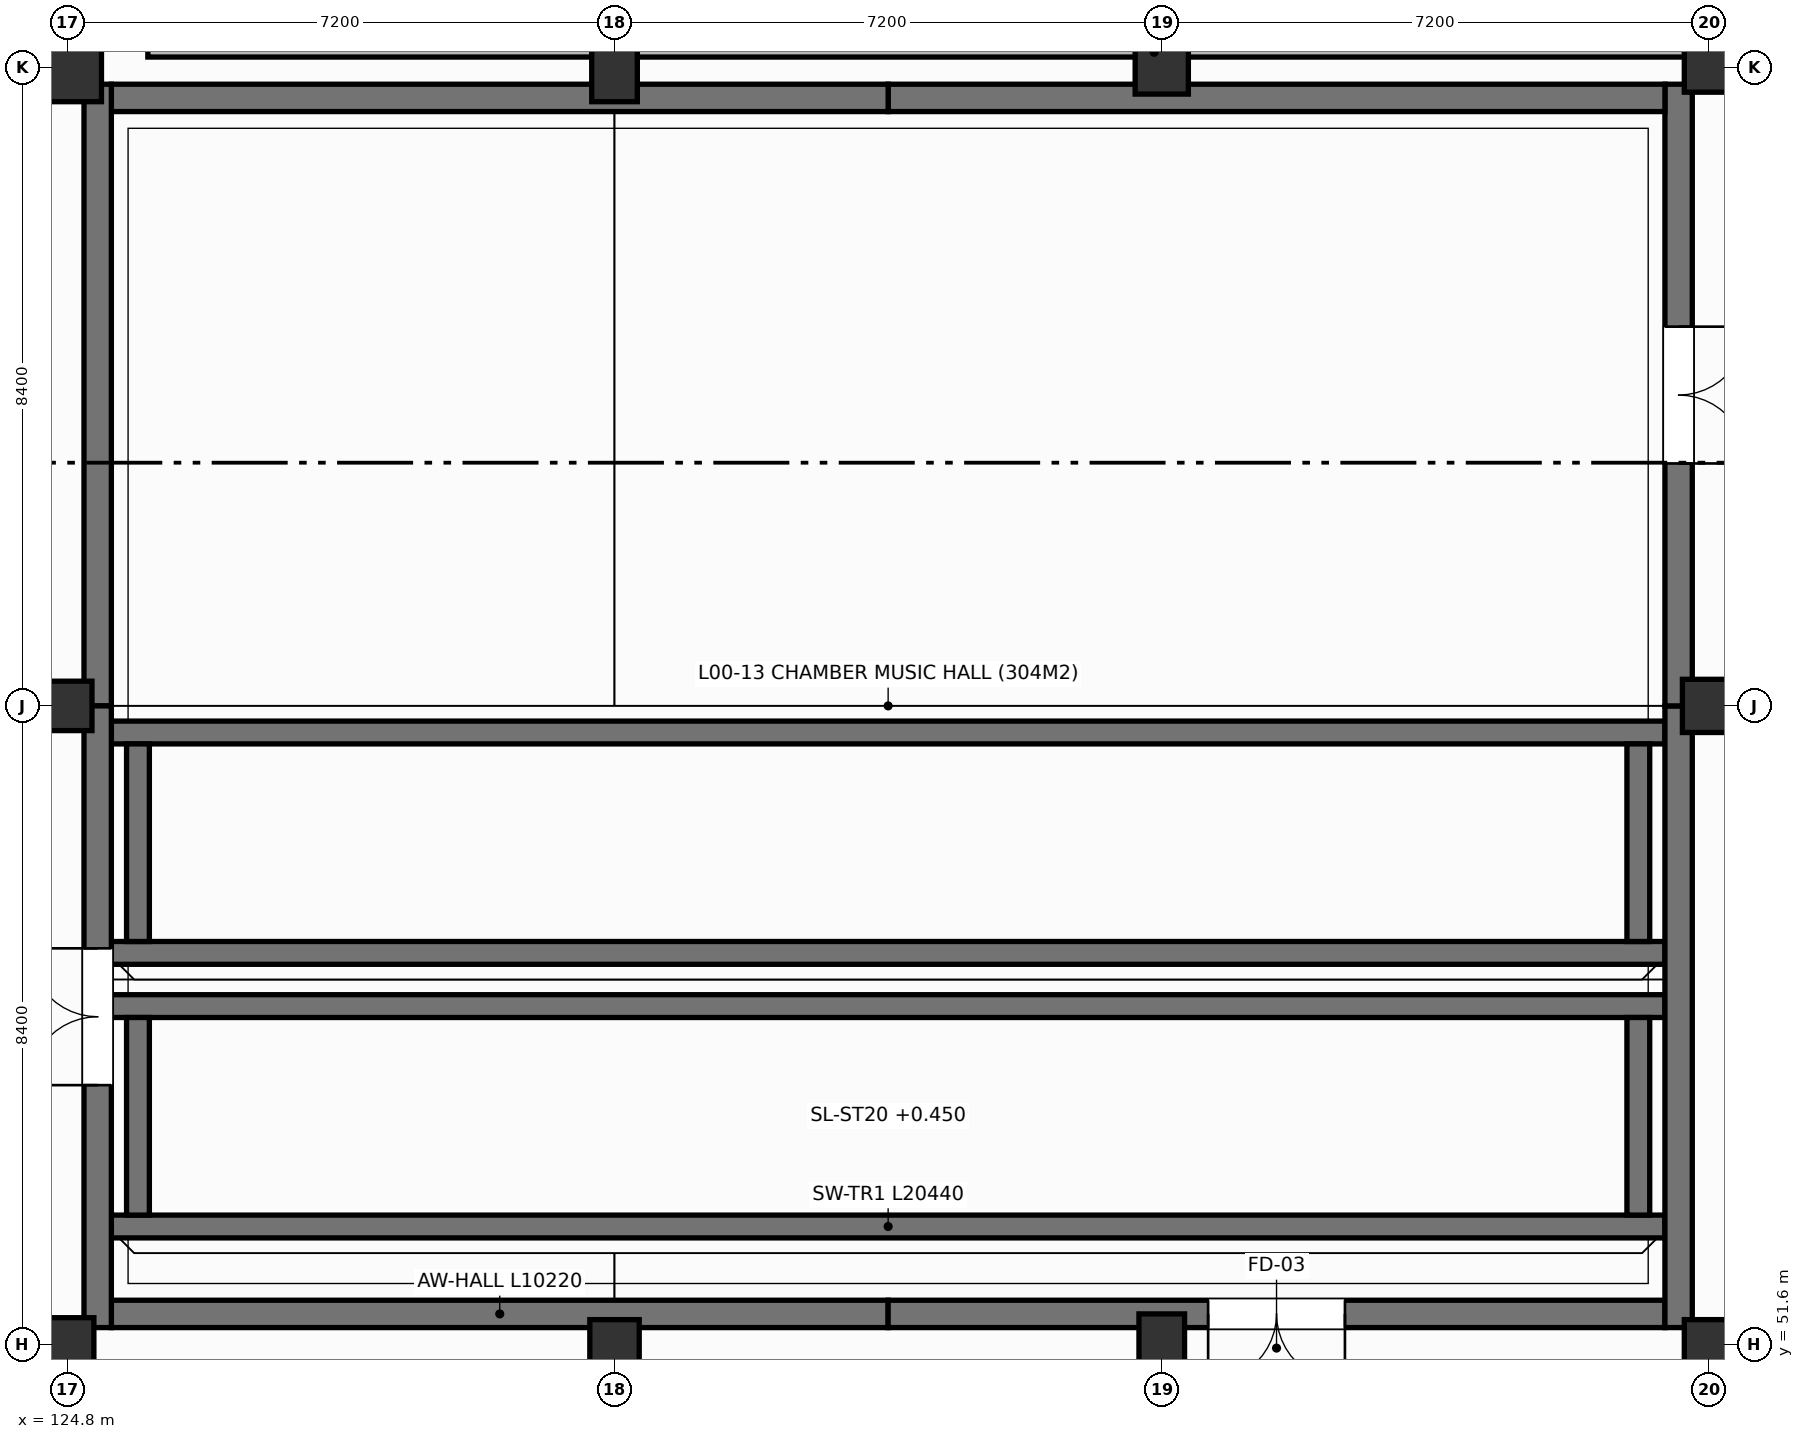
"""IFC4 building model, lengths in metres.
Left out: names, types, materials, properties, quantities, classifications, styles, units other than length and angle.
Written with IfcOpenShell. Run it as: python <this file> out.ifc"""

import sys

from ifc_helpers import new_model, si_unit, direction, frame, frame_2d, origin, origin_2d, place, context, subcontext, project, spatial, rectangle, extrude, element, fill, save


model = new_model("IFC4")
c1 = context("Model", 3, precision=1e-05, world=origin(), true_north=direction((0.0, 1.0)))
c2 = subcontext(c1, "Body", "Model", "MODEL_VIEW")
j1 = project(units=[si_unit("LENGTHUNIT", "METRE"), si_unit("PLANEANGLEUNIT", "RADIAN")], contexts=[c1])
p1 = place(None, origin())
s1 = spatial("IfcSite", under=j1, at=p1, CompositionType="ELEMENT")
p2 = place(p1, origin())
s2 = spatial("IfcBuilding", under=s1, at=p2, CompositionType="ELEMENT")
p3 = place(p2, origin())
s3 = spatial("IfcBuildingStorey", under=s2, at=p3, CompositionType="ELEMENT", Elevation=0.0)
p4 = place(p3, frame((124.8, 51.6, 0.0), z_axis=(0.0, 0.0, 1.0), x_axis=(1.0, 0.0, 0.0)))
e1 = element("IfcColumn", 1, at=p4, inside=s3, PredefinedType="COLUMN", context=c2, shape_type="SweptSolid", body=[
    extrude(rectangle(XDim=0.7, YDim=0.7, at=origin_2d()), origin(), (0.0, 0.0, 1.0), 4.8),
])
p5 = place(p3, frame((124.8, 60.0, 0.0), z_axis=(0.0, 0.0, 1.0), x_axis=(1.0, 0.0, 0.0)))
e2 = element("IfcColumn", 2, at=p5, inside=s3, PredefinedType="COLUMN", context=c2, shape_type="SweptSolid", body=[
    extrude(rectangle(XDim=0.65, YDim=0.65, at=origin_2d()), origin(), (0.0, 0.0, 1.0), 4.8),
])
p6 = place(p3, frame((124.8, 68.4, 0.0), z_axis=(0.0, 0.0, 1.0), x_axis=(1.0, 0.0, 0.0)))
e3 = element("IfcColumn", 3, at=p6, inside=s3, PredefinedType="COLUMN", context=c2, shape_type="SweptSolid", body=[
    extrude(rectangle(XDim=0.9, YDim=0.9, at=origin_2d()), origin(), (0.0, 0.0, 1.0), 4.8),
])
p7 = place(p3, frame((132.0, 51.6, 0.0), z_axis=(0.0, 0.0, 1.0), x_axis=(1.0, 0.0, 0.0)))
e4 = element("IfcColumn", 4, at=p7, inside=s3, PredefinedType="COLUMN", context=c2, shape_type="SweptSolid", body=[
    extrude(rectangle(XDim=0.65, YDim=0.65, at=origin_2d()), origin(), (0.0, 0.0, 1.0), 4.8),
])
p8 = place(p3, frame((132.0, 68.4, 0.0), z_axis=(0.0, 0.0, 1.0), x_axis=(1.0, 0.0, 0.0)))
e5 = element("IfcColumn", 5, at=p8, inside=s3, PredefinedType="COLUMN", context=c2, shape_type="SweptSolid", body=[
    extrude(rectangle(XDim=0.6, YDim=0.9, at=origin_2d()), origin(), (0.0, 0.0, 1.0), 4.8),
])
p9 = place(p3, frame((139.2, 51.6, 0.0), z_axis=(0.0, 0.0, 1.0), x_axis=(1.0, 0.0, 0.0)))
e6 = element("IfcColumn", 6, at=p9, inside=s3, PredefinedType="COLUMN", context=c2, shape_type="SweptSolid", body=[
    extrude(rectangle(XDim=0.6, YDim=0.8, at=origin_2d()), origin(), (0.0, 0.0, 1.0), 4.8),
])
p10 = place(p3, frame((139.2, 68.4, 0.0), z_axis=(0.0, 0.0, 1.0), x_axis=(1.0, 0.0, 0.0)))
e7 = element("IfcColumn", 7, at=p10, inside=s3, PredefinedType="COLUMN", context=c2, shape_type="SweptSolid", body=[
    extrude(rectangle(XDim=0.7, YDim=0.7, at=origin_2d()), origin(), (0.0, 0.0, 1.0), 4.8),
])
p11 = place(p3, frame((146.4, 51.6, 0.0), z_axis=(0.0, 0.0, 1.0), x_axis=(1.0, 0.0, 0.0)))
e8 = element("IfcColumn", 8, at=p11, inside=s3, PredefinedType="COLUMN", context=c2, shape_type="SweptSolid", body=[
    extrude(rectangle(XDim=0.65, YDim=0.65, at=origin_2d()), origin(), (0.0, 0.0, 1.0), 4.8),
])
p12 = place(p3, frame((146.4, 60.0, 0.0), z_axis=(0.0, 0.0, 1.0), x_axis=(1.0, 0.0, 0.0)))
e9 = element("IfcColumn", 9, at=p12, inside=s3, PredefinedType="COLUMN", context=c2, shape_type="SweptSolid", body=[
    extrude(rectangle(XDim=0.7, YDim=0.7, at=origin_2d()), origin(), (0.0, 0.0, 1.0), 4.8),
])
p13 = place(p3, frame((146.4, 68.4, 0.0), z_axis=(0.0, 0.0, 1.0), x_axis=(1.0, 0.0, 0.0)))
e10 = element("IfcColumn", 10, at=p13, inside=s3, PredefinedType="COLUMN", context=c2, shape_type="SweptSolid", body=[
    extrude(rectangle(XDim=0.65, YDim=0.65, at=origin_2d()), origin(), (0.0, 0.0, 1.0), 4.8),
])
for number, where, z_axis, x_axis in (
    (11, (125.38, 53.15, 0.0), (0.0, 0.0, 1.0), (1.0, 0.0, 0.0)),
    (12, (125.38, 56.05, 0.0), (0.0, 0.0, 1.0), (1.0, 0.0, 0.0)),
):
    element("IfcWall", number, at=place(p3, frame(where, z_axis=z_axis, x_axis=x_axis)), inside=s3, PredefinedType="SHEAR", context=c2, shape_type="SweptSolid", body=[
        extrude(rectangle(XDim=20.44, YDim=0.3, at=frame_2d((10.22, 0.0))), origin(), (0.0, 0.0, 1.0), 0.25),
    ])
for number, where, z_axis, x_axis in (
    (13, (125.73, 53.3, 0.0), (0.0, 0.0, 1.0), (0.0, 1.0, 0.0)),
    (14, (145.47, 53.3, 0.0), (0.0, 0.0, 1.0), (0.0, 1.0, 0.0)),
):
    element("IfcWall", number, at=place(p3, frame(where, z_axis=z_axis, x_axis=x_axis)), inside=s3, PredefinedType="SHEAR", context=c2, shape_type="SweptSolid", body=[
        extrude(rectangle(XDim=2.6, YDim=0.3, at=frame_2d((1.3, 0.0))), origin(), (0.0, 0.0, 1.0), 0.25),
    ])
for number, where, z_axis, x_axis in (
    (15, (125.38, 56.75, 0.0), (0.0, 0.0, 1.0), (1.0, 0.0, 0.0)),
    (16, (125.38, 59.65, 0.0), (0.0, 0.0, 1.0), (1.0, 0.0, 0.0)),
):
    element("IfcWall", number, at=place(p3, frame(where, z_axis=z_axis, x_axis=x_axis)), inside=s3, PredefinedType="SHEAR", context=c2, shape_type="SweptSolid", body=[
        extrude(rectangle(XDim=20.44, YDim=0.3, at=frame_2d((10.22, 0.0))), origin(), (0.0, 0.0, 1.0), 0.65),
    ])
for number, where, z_axis, x_axis in (
    (17, (125.73, 56.9, 0.0), (0.0, 0.0, 1.0), (0.0, 1.0, 0.0)),
    (18, (145.47, 56.9, 0.0), (0.0, 0.0, 1.0), (0.0, 1.0, 0.0)),
):
    element("IfcWall", number, at=place(p3, frame(where, z_axis=z_axis, x_axis=x_axis)), inside=s3, PredefinedType="SHEAR", context=c2, shape_type="SweptSolid", body=[
        extrude(rectangle(XDim=2.6, YDim=0.3, at=frame_2d((1.3, 0.0))), origin(), (0.0, 0.0, 1.0), 0.65),
    ])
p14 = place(p3, frame((125.38, 52.0, 0.0), z_axis=(0.0, 0.0, 1.0), x_axis=(1.0, 0.0, 0.0)))
e19 = element("IfcWall", 19, at=p14, inside=s3, PredefinedType="SHEAR", context=c2, shape_type="SweptSolid", body=[
    extrude(rectangle(XDim=10.22, YDim=0.36, at=frame_2d((5.11, 0.0))), origin(), (0.0, 0.0, 1.0), 4.8),
])
p15 = place(p3, frame((135.6, 52.0, 0.0), z_axis=(0.0, 0.0, 1.0), x_axis=(1.0, 0.0, 0.0)))
e20 = element("IfcWall", 20, at=p15, inside=s3, PredefinedType="SHEAR", context=c2, shape_type="SweptSolid", body=[
    extrude(rectangle(XDim=10.22, YDim=0.36, at=frame_2d((5.11, 0.0))), origin(), (0.0, 0.0, 1.0), 4.8),
])
p16 = place(p15, frame((4.21, 0.0, 0.0)))
e21 = element("IfcOpeningElement", 21, at=p16, cuts=e20, PredefinedType="OPENING", context=c2, shape_type="SweptSolid", body=[
    extrude(rectangle(XDim=1.8, YDim=2.25, at=frame_2d((0.9, 1.125))), frame((0.0, 0.19, 0.0), z_axis=(0.0, -1.0, 0.0), x_axis=(1.0, 0.0, 0.0)), (0.0, 0.0, 1.0), 0.38),
])
p17 = place(p3, frame((146.0, 51.82, 0.0), z_axis=(0.0, 0.0, 1.0), x_axis=(0.0, 1.0, 0.0)))
e22 = element("IfcWall", 22, at=p17, inside=s3, PredefinedType="SHEAR", context=c2, shape_type="SweptSolid", body=[
    extrude(rectangle(XDim=8.18, YDim=0.36, at=frame_2d((4.09, 0.0))), origin(), (0.0, 0.0, 1.0), 4.8),
])
p18 = place(p3, frame((146.0, 60.0, 0.0), z_axis=(0.0, 0.0, 1.0), x_axis=(0.0, 1.0, 0.0)))
e23 = element("IfcWall", 23, at=p18, inside=s3, PredefinedType="SHEAR", context=c2, shape_type="SweptSolid", body=[
    extrude(rectangle(XDim=8.18, YDim=0.36, at=frame_2d((4.09, 0.0))), origin(), (0.0, 0.0, 1.0), 4.8),
])
p19 = place(p18, frame((3.19, 0.0, 0.0)))
e24 = element("IfcOpeningElement", 24, at=p19, cuts=e23, PredefinedType="OPENING", context=c2, shape_type="SweptSolid", body=[
    extrude(rectangle(XDim=1.8, YDim=2.25, at=frame_2d((0.9, 1.125))), frame((0.0, 0.19, 0.0), z_axis=(0.0, -1.0, 0.0), x_axis=(1.0, 0.0, 0.0)), (0.0, 0.0, 1.0), 0.38),
])
p20 = place(p3, frame((145.82, 68.0, 0.0), z_axis=(0.0, 0.0, 1.0), x_axis=(-1.0, 0.0, 0.0)))
e25 = element("IfcWall", 25, at=p20, inside=s3, PredefinedType="SHEAR", context=c2, shape_type="SweptSolid", body=[
    extrude(rectangle(XDim=10.22, YDim=0.36, at=frame_2d((5.11, 0.0))), origin(), (0.0, 0.0, 1.0), 4.8),
])
p21 = place(p3, frame((135.6, 68.0, 0.0), z_axis=(0.0, 0.0, 1.0), x_axis=(-1.0, 0.0, 0.0)))
e26 = element("IfcWall", 26, at=p21, inside=s3, PredefinedType="SHEAR", context=c2, shape_type="SweptSolid", body=[
    extrude(rectangle(XDim=10.22, YDim=0.36, at=frame_2d((5.11, 0.0))), origin(), (0.0, 0.0, 1.0), 4.8),
])
p22 = place(p3, frame((125.2, 68.18, 0.0), z_axis=(0.0, 0.0, 1.0), x_axis=(0.0, -1.0, 0.0)))
e27 = element("IfcWall", 27, at=p22, inside=s3, PredefinedType="SHEAR", context=c2, shape_type="SweptSolid", body=[
    extrude(rectangle(XDim=8.18, YDim=0.36, at=frame_2d((4.09, 0.0))), origin(), (0.0, 0.0, 1.0), 4.8),
])
p23 = place(p3, frame((125.2, 60.0, 0.0), z_axis=(0.0, 0.0, 1.0), x_axis=(0.0, -1.0, 0.0)))
e28 = element("IfcWall", 28, at=p23, inside=s3, PredefinedType="SHEAR", context=c2, shape_type="SweptSolid", body=[
    extrude(rectangle(XDim=8.18, YDim=0.36, at=frame_2d((4.09, 0.0))), origin(), (0.0, 0.0, 1.0), 4.8),
])
p24 = place(p23, frame((3.19, 0.0, 0.0)))
e29 = element("IfcOpeningElement", 29, at=p24, cuts=e28, PredefinedType="OPENING", context=c2, shape_type="SweptSolid", body=[
    extrude(rectangle(XDim=1.8, YDim=2.25, at=frame_2d((0.9, 1.125))), frame((0.0, 0.19, 0.0), z_axis=(0.0, -1.0, 0.0), x_axis=(1.0, 0.0, 0.0)), (0.0, 0.0, 1.0), 0.38),
])
p25 = place(p3, frame((125.86, 68.6, 0.0), z_axis=(0.0, 0.0, 1.0), x_axis=(1.0, 0.0, 0.0)))
e30 = element("IfcWall", 30, at=p25, inside=s3, PredefinedType="PARTITIONING", context=c2, shape_type="SweptSolid", body=[
    extrude(rectangle(XDim=26.48, YDim=0.125, at=frame_2d((13.24, 0.0))), origin(), (0.0, 0.0, 1.0), 3.515),
])
p26 = place(p16, frame((1.8, 0.0, 0.0), z_axis=(0.0, 0.0, 1.0), x_axis=(-1.0, 0.0, 0.0)))
e31 = element("IfcDoor", 31, at=p26, inside=s3, OperationType="DOUBLE_DOOR_SINGLE_SWING", PredefinedType="DOOR", context=c2, shape_type="SweptSolid", body=[
    extrude(rectangle(XDim=1.8, YDim=2.25, at=frame_2d((0.9, 1.125))), frame((0.0, 0.025, 0.0), z_axis=(0.0, -1.0, 0.0), x_axis=(1.0, 0.0, 0.0)), (0.0, 0.0, 1.0), 0.05),
])
fill(e21, e31)
p27 = place(p19, frame((1.8, 0.0, 0.0), z_axis=(0.0, 0.0, 1.0), x_axis=(-1.0, 0.0, 0.0)))
e32 = element("IfcDoor", 32, at=p27, inside=s3, OperationType="DOUBLE_DOOR_SINGLE_SWING", PredefinedType="DOOR", context=c2, shape_type="SweptSolid", body=[
    extrude(rectangle(XDim=1.8, YDim=2.25, at=frame_2d((0.9, 1.125))), frame((0.0, 0.025, 0.0), z_axis=(0.0, -1.0, 0.0), x_axis=(1.0, 0.0, 0.0)), (0.0, 0.0, 1.0), 0.05),
])
fill(e24, e32)
p28 = place(p24, frame((1.8, 0.0, 0.0), z_axis=(0.0, 0.0, 1.0), x_axis=(-1.0, 0.0, 0.0)))
e33 = element("IfcDoor", 33, at=p28, inside=s3, OperationType="DOUBLE_DOOR_SINGLE_SWING", PredefinedType="DOOR", context=c2, shape_type="SweptSolid", body=[
    extrude(rectangle(XDim=1.8, YDim=2.25, at=frame_2d((0.9, 1.125))), frame((0.0, 0.025, 0.0), z_axis=(0.0, -1.0, 0.0), x_axis=(1.0, 0.0, 0.0)), (0.0, 0.0, 1.0), 0.05),
])
fill(e29, e33)
save(model, sys.argv[1])
